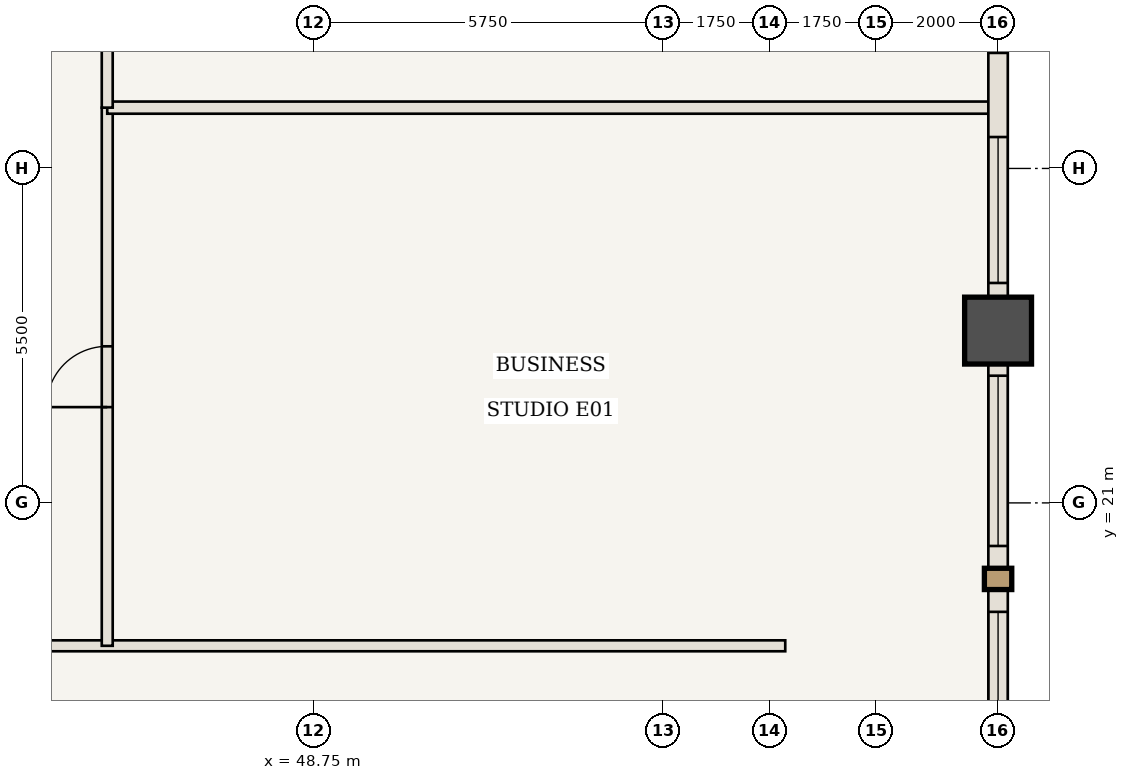
"""IFC4 building model, lengths in metres.
Left out: names, types, materials, properties, quantities, classifications, styles, units other than length and angle.
Written with IfcOpenShell. Run it as: python <this file> out.ifc"""

import sys

from ifc_helpers import new_model, si_unit, direction, frame, frame_2d, origin, origin_2d, place, context, subcontext, project, spatial, rectangle, extrude, element, fill, save


model = new_model("IFC4")
c1 = context("Model", 3, precision=1e-05, world=origin(), true_north=direction((0.0, 1.0)))
c2 = subcontext(c1, "Body", "Model", "MODEL_VIEW")
j1 = project(units=[si_unit("LENGTHUNIT", "METRE"), si_unit("PLANEANGLEUNIT", "RADIAN")], contexts=[c1])
p1 = place(None, origin())
s1 = spatial("IfcSite", under=j1, at=p1, CompositionType="ELEMENT")
p2 = place(p1, origin())
s2 = spatial("IfcBuilding", under=s1, at=p2, CompositionType="ELEMENT")
p3 = place(p2, frame((0.0, 0.0, 59.85)))
s3 = spatial("IfcBuildingStorey", under=s2, at=p3, CompositionType="ELEMENT", Elevation=59.85)
p4 = place(p3, frame((60.0, 23.833, 0.0), z_axis=(0.0, 0.0, 1.0), x_axis=(1.0, 0.0, 0.0)))
e1 = element("IfcColumn", 1, at=p4, inside=s3, PredefinedType="COLUMN", context=c2, shape_type="SweptSolid", body=[
    extrude(rectangle(XDim=1.1, YDim=1.1, at=origin_2d()), origin(), (0.0, 0.0, 1.0), 3.5),
])
p5 = place(p3, frame((33.4, 18.65, 0.0), z_axis=(0.0, 0.0, 1.0), x_axis=(1.0, 0.0, 0.0)))
e2 = element("IfcWall", 2, at=p5, inside=s3, PredefinedType="STANDARD", context=c2, shape_type="SweptSolid", body=[
    extrude(rectangle(XDim=23.1, YDim=0.18, at=frame_2d((11.55, 0.0))), origin(), (0.0, 0.0, 1.0), 3.32),
])
p6 = place(p5, frame((5.45, 0.0, 0.0)))
e3 = element("IfcOpeningElement", 3, at=p6, cuts=e2, PredefinedType="OPENING", context=c2, shape_type="SweptSolid", body=[
    extrude(rectangle(XDim=1.0, YDim=2.15, at=frame_2d((0.5, 1.075))), frame((0.0, 0.1, 0.0), z_axis=(0.0, -1.0, 0.0), x_axis=(1.0, 0.0, 0.0)), (0.0, 0.0, 1.0), 0.2),
])
p7 = place(p3, frame((45.35, 18.65, 0.0), z_axis=(0.0, 0.0, 1.0), x_axis=(0.0, 1.0, 0.0)))
e4 = element("IfcWall", 4, at=p7, inside=s3, PredefinedType="STANDARD", context=c2, shape_type="SweptSolid", body=[
    extrude(rectangle(XDim=8.85, YDim=0.18, at=frame_2d((4.425, 0.0))), origin(), (0.0, 0.0, 1.0), 3.32),
])
p8 = place(p7, frame((3.925, 0.0, 0.0)))
e5 = element("IfcOpeningElement", 5, at=p8, cuts=e4, PredefinedType="OPENING", context=c2, shape_type="SweptSolid", body=[
    extrude(rectangle(XDim=1.0, YDim=2.15, at=frame_2d((0.5, 1.075))), frame((0.0, 0.1, 0.0), z_axis=(0.0, -1.0, 0.0), x_axis=(1.0, 0.0, 0.0)), (0.0, 0.0, 1.0), 0.2),
])
p9 = place(p3, frame((45.35, 27.5, 0.0), z_axis=(0.0, 0.0, 1.0), x_axis=(1.0, 0.0, 0.0)))
e6 = element("IfcWall", 6, at=p9, inside=s3, PredefinedType="STANDARD", context=c2, shape_type="SweptSolid", body=[
    extrude(rectangle(XDim=14.59, YDim=0.2, at=frame_2d((7.295, 0.0))), origin(), (0.0, 0.0, 1.0), 3.32),
])
p10 = place(p3, frame((45.35, 27.5, 0.0), z_axis=(0.0, 0.0, 1.0), x_axis=(0.0, 1.0, 0.0)))
e7 = element("IfcWall", 7, at=p10, inside=s3, PredefinedType="STANDARD", context=c2, shape_type="SweptSolid", body=[
    extrude(rectangle(XDim=11.5, YDim=0.18, at=frame_2d((5.75, 0.0))), origin(), (0.0, 0.0, 1.0), 3.32),
])
p11 = place(p10, frame((5.25, 0.0, 0.0)))
e8 = element("IfcOpeningElement", 8, at=p11, cuts=e7, PredefinedType="OPENING", context=c2, shape_type="SweptSolid", body=[
    extrude(rectangle(XDim=1.0, YDim=2.15, at=frame_2d((0.5, 1.075))), frame((0.0, 0.1, 0.0), z_axis=(0.0, -1.0, 0.0), x_axis=(1.0, 0.0, 0.0)), (0.0, 0.0, 1.0), 0.2),
])
p12 = place(p3, frame((60.0, 23.833, 0.0), z_axis=(0.0, 0.0, 1.0), x_axis=(0.0, -1.0, 0.0)))
e9 = element("IfcWall", 9, at=p12, inside=s3, PredefinedType="USERDEFINED", context=c2, shape_type="SweptSolid", body=[
    extrude(rectangle(XDim=8.167, YDim=0.32, at=frame_2d((4.083, 0.0))), origin(), (0.0, 0.0, 1.0), 2.52),
])
p13 = place(p12, frame((0.742, 0.0, 0.85)))
e10 = element("IfcOpeningElement", 10, at=p13, cuts=e9, PredefinedType="OPENING", context=c2, shape_type="SweptSolid", body=[
    extrude(rectangle(XDim=2.8, YDim=1.47, at=frame_2d((1.4, 0.735))), frame((0.0, 0.17, 0.0), z_axis=(0.0, -1.0, 0.0), x_axis=(1.0, 0.0, 0.0)), (0.0, 0.0, 1.0), 0.34),
])
p14 = place(p12, frame((4.625, 0.0, 0.85)))
e11 = element("IfcOpeningElement", 11, at=p14, cuts=e9, PredefinedType="OPENING", context=c2, shape_type="SweptSolid", body=[
    extrude(rectangle(XDim=2.8, YDim=1.47, at=frame_2d((1.4, 0.735))), frame((0.0, 0.17, 0.0), z_axis=(0.0, -1.0, 0.0), x_axis=(1.0, 0.0, 0.0)), (0.0, 0.0, 1.0), 0.34),
])
p15 = place(p3, frame((60.0, 32.0, 0.0), z_axis=(0.0, 0.0, 1.0), x_axis=(0.0, -1.0, 0.0)))
e12 = element("IfcWall", 12, at=p15, inside=s3, PredefinedType="USERDEFINED", context=c2, shape_type="SweptSolid", body=[
    extrude(rectangle(XDim=8.167, YDim=0.32, at=frame_2d((4.083, 0.0))), origin(), (0.0, 0.0, 1.0), 2.52),
])
p16 = place(p15, frame((1.2, 0.0, 0.85)))
e13 = element("IfcOpeningElement", 13, at=p16, cuts=e12, PredefinedType="OPENING", context=c2, shape_type="SweptSolid", body=[
    extrude(rectangle(XDim=2.4, YDim=1.47, at=frame_2d((1.2, 0.735))), frame((0.0, 0.17, 0.0), z_axis=(0.0, -1.0, 0.0), x_axis=(1.0, 0.0, 0.0)), (0.0, 0.0, 1.0), 0.34),
])
p17 = place(p15, frame((4.983, 0.0, 0.85)))
e14 = element("IfcOpeningElement", 14, at=p17, cuts=e12, PredefinedType="OPENING", context=c2, shape_type="SweptSolid", body=[
    extrude(rectangle(XDim=2.4, YDim=1.47, at=frame_2d((1.2, 0.735))), frame((0.0, 0.17, 0.0), z_axis=(0.0, -1.0, 0.0), x_axis=(1.0, 0.0, 0.0)), (0.0, 0.0, 1.0), 0.34),
])
p18 = place(p8, origin())
e15 = element("IfcDoor", 15, at=p18, inside=s3, OperationType="SINGLE_SWING_LEFT", PredefinedType="DOOR", context=c2, shape_type="SweptSolid", body=[
    extrude(rectangle(XDim=1.0, YDim=2.15, at=frame_2d((0.5, 1.075))), frame((0.0, 0.025, 0.0), z_axis=(0.0, -1.0, 0.0), x_axis=(1.0, 0.0, 0.0)), (0.0, 0.0, 1.0), 0.05),
])
fill(e5, e15)
p19 = place(p13, origin())
e16 = element("IfcWindow", 16, at=p19, inside=s3, PartitioningType="SINGLE_PANEL", PredefinedType="WINDOW", context=c2, shape_type="SweptSolid", body=[
    extrude(rectangle(XDim=2.8, YDim=1.47, at=frame_2d((1.4, 0.735))), frame((0.0, 0.03, 0.0), z_axis=(0.0, -1.0, 0.0), x_axis=(1.0, 0.0, 0.0)), (0.0, 0.0, 1.0), 0.06),
])
fill(e10, e16)
p20 = place(p14, origin())
e17 = element("IfcWindow", 17, at=p20, inside=s3, PartitioningType="SINGLE_PANEL", PredefinedType="WINDOW", context=c2, shape_type="SweptSolid", body=[
    extrude(rectangle(XDim=2.8, YDim=1.47, at=frame_2d((1.4, 0.735))), frame((0.0, 0.03, 0.0), z_axis=(0.0, -1.0, 0.0), x_axis=(1.0, 0.0, 0.0)), (0.0, 0.0, 1.0), 0.06),
])
fill(e11, e17)
p21 = place(p17, origin())
e18 = element("IfcWindow", 18, at=p21, inside=s3, PartitioningType="SINGLE_PANEL", PredefinedType="WINDOW", context=c2, shape_type="SweptSolid", body=[
    extrude(rectangle(XDim=2.4, YDim=1.47, at=frame_2d((1.2, 0.735))), frame((0.0, 0.03, 0.0), z_axis=(0.0, -1.0, 0.0), x_axis=(1.0, 0.0, 0.0)), (0.0, 0.0, 1.0), 0.06),
])
fill(e14, e18)
save(model, sys.argv[1])
